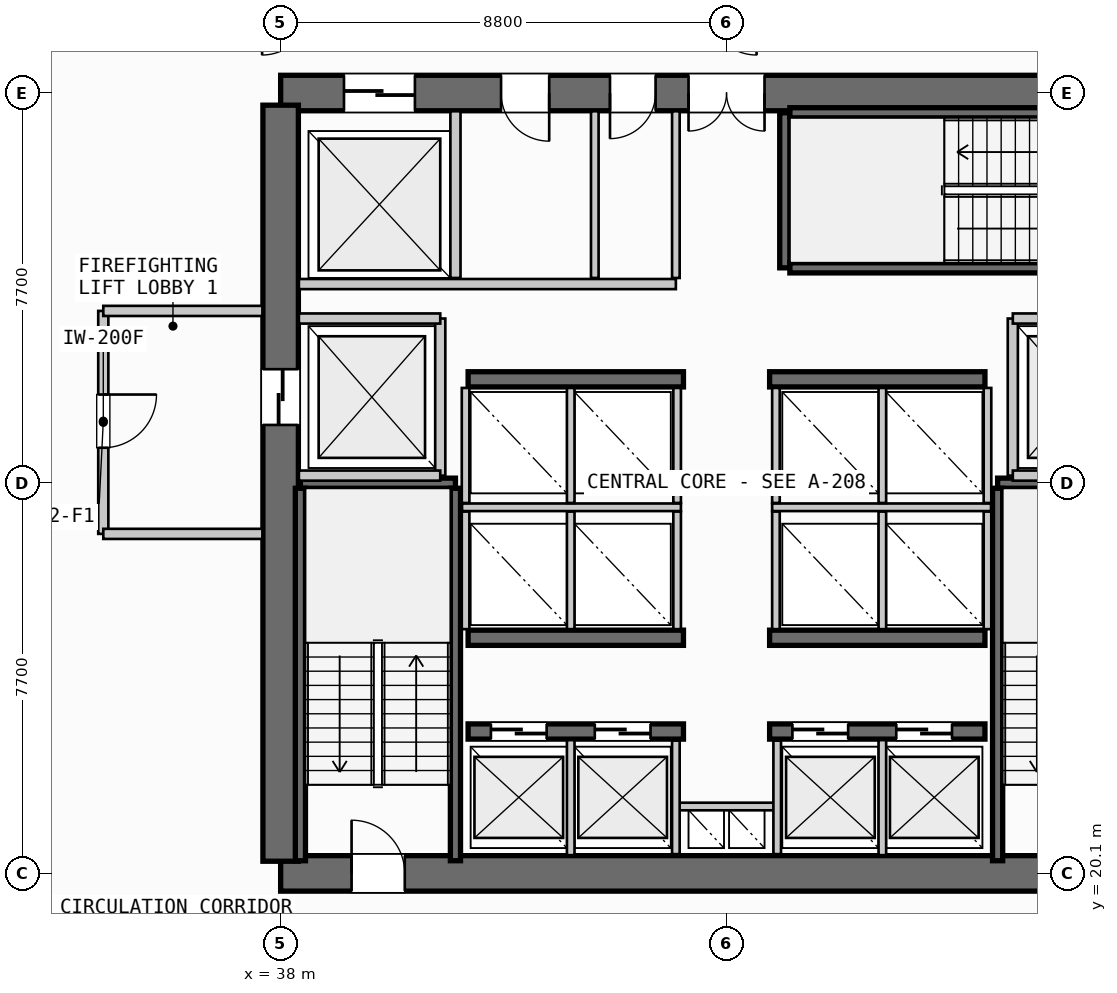
"""IFC4 building model, lengths in metres.
Left out: names, types, materials, properties, quantities, classifications, styles, units other than length and angle.
Written with IfcOpenShell. Run it as: python <this file> out.ifc"""

import sys

from ifc_helpers import new_model, si_unit, direction, frame, frame_2d, origin, place, context, subcontext, project, spatial, rectangle, extrude, source, transform, mapped, element, fill, save


model = new_model("IFC4")
c1 = context("Model", 3, precision=1e-05, world=origin(), true_north=direction((0.0, 1.0)))
c2 = subcontext(c1, "Body", "Model", "MODEL_VIEW")
j1 = project(units=[si_unit("LENGTHUNIT", "METRE"), si_unit("PLANEANGLEUNIT", "RADIAN")], contexts=[c1])
p1 = place(None, origin())
s1 = spatial("IfcSite", under=j1, at=p1, CompositionType="ELEMENT")
p2 = place(p1, origin())
s2 = spatial("IfcBuilding", under=s1, at=p2, CompositionType="ELEMENT")
p3 = place(p2, frame((0.0, 0.0, 52.4)))
s3 = spatial("IfcBuildingStorey", under=s2, at=p3, CompositionType="ELEMENT", Elevation=52.4)
p4 = place(p3, frame((38.0, 20.1, 0.0), z_axis=(0.0, 0.0, 1.0), x_axis=(1.0, 0.0, 0.0)))
e1 = element("IfcWall", 1, at=p4, inside=s3, PredefinedType="SHEAR", context=c2, shape_type="SweptSolid", body=[
    extrude(rectangle(XDim=17.6, YDim=0.7, at=frame_2d((8.8, 0.0))), origin(), (0.0, 0.0, 1.0), 3.55),
])
p5 = place(p4, frame((1.4, 0.0, 0.0)))
e2 = element("IfcOpeningElement", 2, at=p5, cuts=e1, PredefinedType="OPENING", context=c2, shape_type="SweptSolid", body=[
    extrude(rectangle(XDim=1.05, YDim=2.15, at=frame_2d((0.525, 1.075))), frame((0.0, 0.36, 0.0), z_axis=(0.0, -1.0, 0.0), x_axis=(1.0, 0.0, 0.0)), (0.0, 0.0, 1.0), 0.72),
])
p6 = place(p4, frame((15.15, 0.0, 0.0)))
e3 = element("IfcOpeningElement", 3, at=p6, cuts=e1, PredefinedType="OPENING", context=c2, shape_type="SweptSolid", body=[
    extrude(rectangle(XDim=1.05, YDim=2.15, at=frame_2d((0.525, 1.075))), frame((0.0, 0.36, 0.0), z_axis=(0.0, -1.0, 0.0), x_axis=(1.0, 0.0, 0.0)), (0.0, 0.0, 1.0), 0.72),
])
p7 = place(p3, frame((55.6, 35.5, 0.0), z_axis=(0.0, 0.0, 1.0), x_axis=(-1.0, 0.0, 0.0)))
e4 = element("IfcWall", 4, at=p7, inside=s3, PredefinedType="SHEAR", context=c2, shape_type="SweptSolid", body=[
    extrude(rectangle(XDim=17.6, YDim=0.7, at=frame_2d((8.8, 0.0))), origin(), (0.0, 0.0, 1.0), 3.55),
])
p8 = place(p7, frame((8.05, 0.0, 0.0)))
e5 = element("IfcOpeningElement", 5, at=p8, cuts=e4, PredefinedType="OPENING", context=c2, shape_type="SweptSolid", body=[
    extrude(rectangle(XDim=1.5, YDim=2.2, at=frame_2d((0.75, 1.1))), frame((0.0, 0.36, 0.0), z_axis=(0.0, -1.0, 0.0), x_axis=(1.0, 0.0, 0.0)), (0.0, 0.0, 1.0), 0.72),
])
p9 = place(p7, frame((14.95, 0.0, 0.0)))
e6 = element("IfcOpeningElement", 6, at=p9, cuts=e4, PredefinedType="OPENING", context=c2, shape_type="SweptSolid", body=[
    extrude(rectangle(XDim=1.4, YDim=2.3, at=frame_2d((0.7, 1.15))), frame((0.0, 0.36, 0.0), z_axis=(0.0, -1.0, 0.0), x_axis=(1.0, 0.0, 0.0)), (0.0, 0.0, 1.0), 0.72),
])
p10 = place(p7, frame((12.3, 0.0, 0.0)))
e7 = element("IfcOpeningElement", 7, at=p10, cuts=e4, PredefinedType="OPENING", context=c2, shape_type="SweptSolid", body=[
    extrude(rectangle(XDim=0.95, YDim=2.15, at=frame_2d((0.475, 1.075))), frame((0.0, 0.36, 0.0), z_axis=(0.0, -1.0, 0.0), x_axis=(1.0, 0.0, 0.0)), (0.0, 0.0, 1.0), 0.72),
])
p11 = place(p7, frame((10.2, 0.0, 0.0)))
e8 = element("IfcOpeningElement", 8, at=p11, cuts=e4, PredefinedType="OPENING", context=c2, shape_type="SweptSolid", body=[
    extrude(rectangle(XDim=0.9, YDim=2.15, at=frame_2d((0.45, 1.075))), frame((0.0, 0.36, 0.0), z_axis=(0.0, -1.0, 0.0), x_axis=(1.0, 0.0, 0.0)), (0.0, 0.0, 1.0), 0.72),
])
p12 = place(p3, frame((38.0, 35.26, 0.0), z_axis=(0.0, 0.0, 1.0), x_axis=(0.0, -1.0, 0.0)))
e9 = element("IfcWall", 9, at=p12, inside=s3, PredefinedType="SHEAR", context=c2, shape_type="SweptSolid", body=[
    extrude(rectangle(XDim=14.92, YDim=0.7, at=frame_2d((7.46, 0.0))), origin(), (0.0, 0.0, 1.0), 3.55),
])
p13 = place(p12, frame((5.21, 0.0, 0.0)))
e10 = element("IfcOpeningElement", 10, at=p13, cuts=e9, PredefinedType="OPENING", context=c2, shape_type="SweptSolid", body=[
    extrude(rectangle(XDim=1.1, YDim=2.2, at=frame_2d((0.55, 1.1))), frame((0.0, 0.36, 0.0), z_axis=(0.0, -1.0, 0.0), x_axis=(1.0, 0.0, 0.0)), (0.0, 0.0, 1.0), 0.72),
])
p14 = place(p3, frame((41.7, 22.9, 0.0), z_axis=(0.0, 0.0, 1.0), x_axis=(1.0, 0.0, 0.0)))
e11 = element("IfcWall", 11, at=p14, inside=s3, PredefinedType="SHEAR", context=c2, shape_type="SweptSolid", body=[
    extrude(rectangle(XDim=4.25, YDim=0.3, at=frame_2d((2.125, 0.0))), origin(), (0.0, 0.0, 1.0), 3.55),
])
p15 = place(p14, frame((0.45, 0.0, 0.0)))
e12 = element("IfcOpeningElement", 12, at=p15, cuts=e11, PredefinedType="OPENING", context=c2, shape_type="SweptSolid", body=[
    extrude(rectangle(XDim=1.1, YDim=2.2, at=frame_2d((0.55, 1.1))), frame((0.0, 0.16, 0.0), z_axis=(0.0, -1.0, 0.0), x_axis=(1.0, 0.0, 0.0)), (0.0, 0.0, 1.0), 0.32),
])
p16 = place(p14, frame((2.5, 0.0, 0.0)))
e13 = element("IfcOpeningElement", 13, at=p16, cuts=e11, PredefinedType="OPENING", context=c2, shape_type="SweptSolid", body=[
    extrude(rectangle(XDim=1.1, YDim=2.2, at=frame_2d((0.55, 1.1))), frame((0.0, 0.16, 0.0), z_axis=(0.0, -1.0, 0.0), x_axis=(1.0, 0.0, 0.0)), (0.0, 0.0, 1.0), 0.32),
])
p17 = place(p3, frame((47.65, 22.9, 0.0), z_axis=(0.0, 0.0, 1.0), x_axis=(1.0, 0.0, 0.0)))
e14 = element("IfcWall", 14, at=p17, inside=s3, PredefinedType="SHEAR", context=c2, shape_type="SweptSolid", body=[
    extrude(rectangle(XDim=4.25, YDim=0.3, at=frame_2d((2.125, 0.0))), origin(), (0.0, 0.0, 1.0), 3.55),
])
p18 = place(p17, frame((0.45, 0.0, 0.0)))
e15 = element("IfcOpeningElement", 15, at=p18, cuts=e14, PredefinedType="OPENING", context=c2, shape_type="SweptSolid", body=[
    extrude(rectangle(XDim=1.1, YDim=2.2, at=frame_2d((0.55, 1.1))), frame((0.0, 0.16, 0.0), z_axis=(0.0, -1.0, 0.0), x_axis=(1.0, 0.0, 0.0)), (0.0, 0.0, 1.0), 0.32),
])
p19 = place(p17, frame((2.5, 0.0, 0.0)))
e16 = element("IfcOpeningElement", 16, at=p19, cuts=e14, PredefinedType="OPENING", context=c2, shape_type="SweptSolid", body=[
    extrude(rectangle(XDim=1.1, YDim=2.2, at=frame_2d((0.55, 1.1))), frame((0.0, 0.16, 0.0), z_axis=(0.0, -1.0, 0.0), x_axis=(1.0, 0.0, 0.0)), (0.0, 0.0, 1.0), 0.32),
])
for number, where, z_axis, x_axis in (
    (17, (41.7, 24.75, 0.0), (0.0, 0.0, 1.0), (1.0, 0.0, 0.0)),
    (18, (47.65, 24.75, 0.0), (0.0, 0.0, 1.0), (1.0, 0.0, 0.0)),
    (19, (41.7, 29.85, 0.0), (0.0, 0.0, 1.0), (1.0, 0.0, 0.0)),
    (20, (47.65, 29.85, 0.0), (0.0, 0.0, 1.0), (1.0, 0.0, 0.0)),
):
    element("IfcWall", number, at=place(p3, frame(where, z_axis=z_axis, x_axis=x_axis)), inside=s3, PredefinedType="SHEAR", context=c2, shape_type="SweptSolid", body=[
        extrude(rectangle(XDim=4.25, YDim=0.3, at=frame_2d((2.125, 0.0))), origin(), (0.0, 0.0, 1.0), 3.55),
    ])
p20 = place(p3, frame((38.39, 27.8, 0.0), z_axis=(0.0, 0.0, 1.0), x_axis=(1.0, 0.0, 0.0)))
e21 = element("IfcWall", 21, at=p20, inside=s3, PredefinedType="SHEAR", context=c2, shape_type="SweptSolid", body=[
    extrude(rectangle(XDim=3.06, YDim=0.2, at=frame_2d((1.53, 0.0))), origin(), (0.0, 0.0, 1.0), 3.55),
])
for number, where, z_axis, x_axis in (
    (22, (41.45, 27.7, 0.0), (0.0, 0.0, 1.0), (0.0, -1.0, 0.0)),
    (23, (38.39, 20.35, 0.0), (0.0, 0.0, 1.0), (0.0, 1.0, 0.0)),
):
    element("IfcWall", number, at=place(p3, frame(where, z_axis=z_axis, x_axis=x_axis)), inside=s3, PredefinedType="SHEAR", context=c2, shape_type="SweptSolid", body=[
        extrude(rectangle(XDim=7.35, YDim=0.2, at=frame_2d((3.675, 0.0))), origin(), (0.0, 0.0, 1.0), 3.55),
    ])
p21 = place(p3, frame((52.15, 27.8, 0.0), z_axis=(0.0, 0.0, 1.0), x_axis=(1.0, 0.0, 0.0)))
e24 = element("IfcWall", 24, at=p21, inside=s3, PredefinedType="SHEAR", context=c2, shape_type="SweptSolid", body=[
    extrude(rectangle(XDim=3.06, YDim=0.2, at=frame_2d((1.53, 0.0))), origin(), (0.0, 0.0, 1.0), 3.55),
])
p22 = place(p3, frame((52.15, 20.35, 0.0), z_axis=(0.0, 0.0, 1.0), x_axis=(0.0, 1.0, 0.0)))
e25 = element("IfcWall", 25, at=p22, inside=s3, PredefinedType="SHEAR", context=c2, shape_type="SweptSolid", body=[
    extrude(rectangle(XDim=7.35, YDim=0.2, at=frame_2d((3.675, 0.0))), origin(), (0.0, 0.0, 1.0), 3.55),
])
p23 = place(p3, frame((47.95, 32.05, 0.0), z_axis=(0.0, 0.0, 1.0), x_axis=(0.0, 1.0, 0.0)))
e26 = element("IfcWall", 26, at=p23, inside=s3, PredefinedType="SHEAR", context=c2, shape_type="SweptSolid", body=[
    extrude(rectangle(XDim=3.06, YDim=0.2, at=frame_2d((1.53, 0.0))), origin(), (0.0, 0.0, 1.0), 3.55),
])
for number, where, z_axis, x_axis in (
    (27, (48.05, 35.11, 0.0), (0.0, 0.0, 1.0), (1.0, 0.0, 0.0)),
    (28, (55.4, 32.05, 0.0), (0.0, 0.0, 1.0), (-1.0, 0.0, 0.0)),
):
    element("IfcWall", number, at=place(p3, frame(where, z_axis=z_axis, x_axis=x_axis)), inside=s3, PredefinedType="SHEAR", context=c2, shape_type="SweptSolid", body=[
        extrude(rectangle(XDim=7.35, YDim=0.2, at=frame_2d((3.675, 0.0))), origin(), (0.0, 0.0, 1.0), 3.55),
    ])
p24 = place(p3, frame((45.8, 21.42, 0.0), z_axis=(0.0, 0.0, 1.0), x_axis=(1.0, 0.0, 0.0)))
e29 = element("IfcWall", 29, at=p24, inside=s3, PredefinedType="PARTITIONING", context=c2, shape_type="SweptSolid", body=[
    extrude(rectangle(XDim=2.0, YDim=0.15, at=frame_2d((1.0, 0.0))), origin(), (0.0, 0.0, 1.0), 2.645),
])
for number, where, z_axis, x_axis in (
    (30, (45.8, 20.48, 0.0), (0.0, 0.0, 1.0), (0.0, 1.0, 0.0)),
    (31, (47.8, 20.48, 0.0), (0.0, 0.0, 1.0), (0.0, 1.0, 0.0)),
):
    element("IfcWall", number, at=place(p3, frame(where, z_axis=z_axis, x_axis=x_axis)), inside=s3, PredefinedType="PARTITIONING", context=c2, shape_type="SweptSolid", body=[
        extrude(rectangle(XDim=2.24, YDim=0.15, at=frame_2d((1.12, 0.0))), origin(), (0.0, 0.0, 1.0), 2.645),
    ])
p25 = place(p3, frame((41.15, 27.95, 0.0), z_axis=(0.0, 0.0, 1.0), x_axis=(0.0, 1.0, 0.0)))
e32 = element("IfcWall", 32, at=p25, inside=s3, PredefinedType="PARTITIONING", context=c2, shape_type="SweptSolid", body=[
    extrude(rectangle(XDim=3.1, YDim=0.2, at=frame_2d((1.55, 0.0))), origin(), (0.0, 0.0, 1.0), 2.645),
])
for number, where, z_axis, x_axis in (
    (33, (38.36, 27.95, 0.0), (0.0, 0.0, 1.0), (1.0, 0.0, 0.0)),
    (34, (38.36, 31.05, 0.0), (0.0, 0.0, 1.0), (1.0, 0.0, 0.0)),
):
    element("IfcWall", number, at=place(p3, frame(where, z_axis=z_axis, x_axis=x_axis)), inside=s3, PredefinedType="PARTITIONING", context=c2, shape_type="SweptSolid", body=[
        extrude(rectangle(XDim=2.79, YDim=0.2, at=frame_2d((1.395, 0.0))), origin(), (0.0, 0.0, 1.0), 2.645),
    ])
p26 = place(p3, frame((34.5, 31.2, 0.0), z_axis=(0.0, 0.0, 1.0), x_axis=(0.0, -1.0, 0.0)))
e35 = element("IfcWall", 35, at=p26, inside=s3, PredefinedType="PARTITIONING", context=c2, shape_type="SweptSolid", body=[
    extrude(rectangle(XDim=4.4, YDim=0.2, at=frame_2d((2.2, 0.0))), origin(), (0.0, 0.0, 1.0), 2.645),
])
p27 = place(p26, frame((1.65, 0.0, 0.0)))
e36 = element("IfcOpeningElement", 36, at=p27, cuts=e35, PredefinedType="OPENING", context=c2, shape_type="SweptSolid", body=[
    extrude(rectangle(XDim=1.05, YDim=2.15, at=frame_2d((0.525, 1.075))), frame((0.0, 0.11, 0.0), z_axis=(0.0, -1.0, 0.0), x_axis=(1.0, 0.0, 0.0)), (0.0, 0.0, 1.0), 0.22),
])
for number, where, z_axis, x_axis in (
    (37, (34.5, 26.8, 0.0), (0.0, 0.0, 1.0), (1.0, 0.0, 0.0)),
    (38, (34.5, 31.2, 0.0), (0.0, 0.0, 1.0), (1.0, 0.0, 0.0)),
):
    element("IfcWall", number, at=place(p3, frame(where, z_axis=z_axis, x_axis=x_axis)), inside=s3, PredefinedType="PARTITIONING", context=c2, shape_type="SweptSolid", body=[
        extrude(rectangle(XDim=3.14, YDim=0.2, at=frame_2d((1.57, 0.0))), origin(), (0.0, 0.0, 1.0), 2.645),
    ])
p28 = place(p3, frame((52.45, 27.95, 0.0), z_axis=(0.0, 0.0, 1.0), x_axis=(0.0, 1.0, 0.0)))
e39 = element("IfcWall", 39, at=p28, inside=s3, PredefinedType="PARTITIONING", context=c2, shape_type="SweptSolid", body=[
    extrude(rectangle(XDim=3.1, YDim=0.2, at=frame_2d((1.55, 0.0))), origin(), (0.0, 0.0, 1.0), 2.645),
])
for number, where, z_axis, x_axis in (
    (40, (52.45, 27.95, 0.0), (0.0, 0.0, 1.0), (1.0, 0.0, 0.0)),
    (41, (52.45, 31.05, 0.0), (0.0, 0.0, 1.0), (1.0, 0.0, 0.0)),
):
    element("IfcWall", number, at=place(p3, frame(where, z_axis=z_axis, x_axis=x_axis)), inside=s3, PredefinedType="PARTITIONING", context=c2, shape_type="SweptSolid", body=[
        extrude(rectangle(XDim=2.79, YDim=0.2, at=frame_2d((1.395, 0.0))), origin(), (0.0, 0.0, 1.0), 2.645),
    ])
for number, where, z_axis, x_axis in (
    (42, (43.725, 20.46, 0.0), (0.0, 0.0, 1.0), (0.0, 1.0, 0.0)),
    (43, (49.875, 20.46, 0.0), (0.0, 0.0, 1.0), (0.0, 1.0, 0.0)),
):
    element("IfcWall", number, at=place(p3, frame(where, z_axis=z_axis, x_axis=x_axis)), inside=s3, PredefinedType="PARTITIONING", context=c2, shape_type="SweptSolid", body=[
        extrude(rectangle(XDim=2.27, YDim=0.15, at=frame_2d((1.135, 0.0))), origin(), (0.0, 0.0, 1.0), 2.645),
    ])
p29 = place(p3, frame((41.58, 27.325, 0.0), z_axis=(0.0, 0.0, 1.0), x_axis=(1.0, 0.0, 0.0)))
e44 = element("IfcWall", 44, at=p29, inside=s3, PredefinedType="PARTITIONING", context=c2, shape_type="SweptSolid", body=[
    extrude(rectangle(XDim=4.32, YDim=0.15, at=frame_2d((2.16, 0.0))), origin(), (0.0, 0.0, 1.0), 2.645),
])
p30 = place(p3, frame((47.7, 27.325, 0.0), z_axis=(0.0, 0.0, 1.0), x_axis=(1.0, 0.0, 0.0)))
e45 = element("IfcWall", 45, at=p30, inside=s3, PredefinedType="PARTITIONING", context=c2, shape_type="SweptSolid", body=[
    extrude(rectangle(XDim=4.32, YDim=0.15, at=frame_2d((2.16, 0.0))), origin(), (0.0, 0.0, 1.0), 2.645),
])
for number, where, z_axis, x_axis in (
    (46, (41.65, 24.92, 0.0), (0.0, 0.0, 1.0), (0.0, 1.0, 0.0)),
    (47, (43.725, 24.92, 0.0), (0.0, 0.0, 1.0), (0.0, 1.0, 0.0)),
    (48, (45.825, 24.92, 0.0), (0.0, 0.0, 1.0), (0.0, 1.0, 0.0)),
    (49, (47.775, 24.92, 0.0), (0.0, 0.0, 1.0), (0.0, 1.0, 0.0)),
    (50, (49.875, 24.92, 0.0), (0.0, 0.0, 1.0), (0.0, 1.0, 0.0)),
    (51, (51.95, 24.92, 0.0), (0.0, 0.0, 1.0), (0.0, 1.0, 0.0)),
):
    element("IfcWall", number, at=place(p3, frame(where, z_axis=z_axis, x_axis=x_axis)), inside=s3, PredefinedType="PARTITIONING", context=c2, shape_type="SweptSolid", body=[
        extrude(rectangle(XDim=2.32, YDim=0.15, at=frame_2d((1.16, 0.0))), origin(), (0.0, 0.0, 1.0), 2.645),
    ])
for number, where, z_axis, x_axis in (
    (52, (41.65, 27.41, 0.0), (0.0, 0.0, 1.0), (0.0, 1.0, 0.0)),
    (53, (43.725, 27.41, 0.0), (0.0, 0.0, 1.0), (0.0, 1.0, 0.0)),
    (54, (45.825, 27.41, 0.0), (0.0, 0.0, 1.0), (0.0, 1.0, 0.0)),
    (55, (47.775, 27.41, 0.0), (0.0, 0.0, 1.0), (0.0, 1.0, 0.0)),
    (56, (49.875, 27.41, 0.0), (0.0, 0.0, 1.0), (0.0, 1.0, 0.0)),
    (57, (51.95, 27.41, 0.0), (0.0, 0.0, 1.0), (0.0, 1.0, 0.0)),
):
    element("IfcWall", number, at=place(p3, frame(where, z_axis=z_axis, x_axis=x_axis)), inside=s3, PredefinedType="PARTITIONING", context=c2, shape_type="SweptSolid", body=[
        extrude(rectangle(XDim=2.27, YDim=0.15, at=frame_2d((1.135, 0.0))), origin(), (0.0, 0.0, 1.0), 2.645),
    ])
p31 = place(p3, frame((41.45, 31.85, 0.0), z_axis=(0.0, 0.0, 1.0), x_axis=(0.0, 1.0, 0.0)))
e58 = element("IfcWall", 58, at=p31, inside=s3, PredefinedType="PARTITIONING", context=c2, shape_type="SweptSolid", body=[
    extrude(rectangle(XDim=3.29, YDim=0.2, at=frame_2d((1.645, 0.0))), origin(), (0.0, 0.0, 1.0), 2.645),
])
p32 = place(p3, frame((38.36, 31.73, 0.0), z_axis=(0.0, 0.0, 1.0), x_axis=(1.0, 0.0, 0.0)))
e59 = element("IfcWall", 59, at=p32, inside=s3, PredefinedType="PARTITIONING", context=c2, shape_type="SweptSolid", body=[
    extrude(rectangle(XDim=7.44, YDim=0.2, at=frame_2d((3.72, 0.0))), origin(), (0.0, 0.0, 1.0), 2.645),
])
p33 = place(p3, frame((45.8, 31.85, 0.0), z_axis=(0.0, 0.0, 1.0), x_axis=(0.0, 1.0, 0.0)))
e60 = element("IfcWall", 60, at=p33, inside=s3, PredefinedType="PARTITIONING", context=c2, shape_type="SweptSolid", body=[
    extrude(rectangle(XDim=3.29, YDim=0.15, at=frame_2d((1.645, 0.0))), origin(), (0.0, 0.0, 1.0), 2.645),
])
p34 = place(p3, frame((44.2, 31.85, 0.0), z_axis=(0.0, 0.0, 1.0), x_axis=(0.0, 1.0, 0.0)))
e61 = element("IfcWall", 61, at=p34, inside=s3, PredefinedType="PLUMBINGWALL", context=c2, shape_type="SweptSolid", body=[
    extrude(rectangle(XDim=3.29, YDim=0.15, at=frame_2d((1.645, 0.0))), origin(), (0.0, 0.0, 1.0), 2.645),
])
m1 = source(origin(), c2, "Body", "SweptSolid", [
    extrude(rectangle(XDim=1.05, YDim=2.15, at=frame_2d((0.525, 1.075))), frame((0.0, 0.025, 0.0), z_axis=(0.0, -1.0, 0.0), x_axis=(1.0, 0.0, 0.0)), (0.0, 0.0, 1.0), 0.05),
])
p35 = place(p5, origin())
e62 = element("IfcDoor", 62, at=p35, inside=s3, OperationType="SINGLE_SWING_LEFT", PredefinedType="DOOR", context=c2, shape_type="MappedRepresentation", body=[
    mapped(m1, transform((0.0, 0.0, 0.0), scale=1.0)),
])
fill(e2, e62)
m2 = source(origin(), c2, "Body", "SweptSolid", [
    extrude(rectangle(XDim=1.5, YDim=2.2, at=frame_2d((0.75, 1.1))), frame((0.0, 0.025, 0.0), z_axis=(0.0, -1.0, 0.0), x_axis=(1.0, 0.0, 0.0)), (0.0, 0.0, 1.0), 0.05),
])
p36 = place(p8, origin())
e63 = element("IfcDoor", 63, at=p36, inside=s3, OperationType="DOUBLE_DOOR_SINGLE_SWING", PredefinedType="DOOR", context=c2, shape_type="MappedRepresentation", body=[
    mapped(m2, transform((0.0, 0.0, 0.0), scale=1.0)),
])
fill(e5, e63)
m3 = source(origin(), c2, "Body", "SweptSolid", [
    extrude(rectangle(XDim=1.1, YDim=2.2, at=frame_2d((0.55, 1.1))), frame((0.0, 0.025, 0.0), z_axis=(0.0, -1.0, 0.0), x_axis=(1.0, 0.0, 0.0)), (0.0, 0.0, 1.0), 0.05),
])
p37 = place(p13, origin())
e64 = element("IfcDoor", 64, at=p37, inside=s3, OperationType="SLIDING_TO_LEFT", PredefinedType="DOOR", context=c2, shape_type="MappedRepresentation", body=[
    mapped(m3, transform((0.0, 0.0, 0.0), scale=1.0)),
])
fill(e10, e64)
p38 = place(p15, origin())
e65 = element("IfcDoor", 65, at=p38, inside=s3, OperationType="SLIDING_TO_LEFT", PredefinedType="DOOR", context=c2, shape_type="MappedRepresentation", body=[
    mapped(m3, transform((0.0, 0.0, 0.0), scale=1.0)),
])
fill(e12, e65)
p39 = place(p16, origin())
e66 = element("IfcDoor", 66, at=p39, inside=s3, OperationType="SLIDING_TO_LEFT", PredefinedType="DOOR", context=c2, shape_type="MappedRepresentation", body=[
    mapped(m3, transform((0.0, 0.0, 0.0), scale=1.0)),
])
fill(e13, e66)
p40 = place(p18, origin())
e67 = element("IfcDoor", 67, at=p40, inside=s3, OperationType="SLIDING_TO_LEFT", PredefinedType="DOOR", context=c2, shape_type="MappedRepresentation", body=[
    mapped(m3, transform((0.0, 0.0, 0.0), scale=1.0)),
])
fill(e15, e67)
p41 = place(p19, origin())
e68 = element("IfcDoor", 68, at=p41, inside=s3, OperationType="SLIDING_TO_LEFT", PredefinedType="DOOR", context=c2, shape_type="MappedRepresentation", body=[
    mapped(m3, transform((0.0, 0.0, 0.0), scale=1.0)),
])
fill(e16, e68)
m4 = source(origin(), c2, "Body", "SweptSolid", [
    extrude(rectangle(XDim=1.4, YDim=2.3, at=frame_2d((0.7, 1.15))), frame((0.0, 0.025, 0.0), z_axis=(0.0, -1.0, 0.0), x_axis=(1.0, 0.0, 0.0)), (0.0, 0.0, 1.0), 0.05),
])
p42 = place(p9, origin())
e69 = element("IfcDoor", 69, at=p42, inside=s3, OperationType="SLIDING_TO_RIGHT", PredefinedType="DOOR", context=c2, shape_type="MappedRepresentation", body=[
    mapped(m4, transform((0.0, 0.0, 0.0), scale=1.0)),
])
fill(e6, e69)
m5 = source(origin(), c2, "Body", "SweptSolid", [
    extrude(rectangle(XDim=0.95, YDim=2.15, at=frame_2d((0.475, 1.075))), frame((0.0, 0.025, 0.0), z_axis=(0.0, -1.0, 0.0), x_axis=(1.0, 0.0, 0.0)), (0.0, 0.0, 1.0), 0.05),
])
p43 = place(p10, origin())
e70 = element("IfcDoor", 70, at=p43, inside=s3, OperationType="SINGLE_SWING_LEFT", PredefinedType="DOOR", context=c2, shape_type="MappedRepresentation", body=[
    mapped(m5, transform((0.0, 0.0, 0.0), scale=1.0)),
])
fill(e7, e70)
m6 = source(origin(), c2, "Body", "SweptSolid", [
    extrude(rectangle(XDim=0.9, YDim=2.15, at=frame_2d((0.45, 1.075))), frame((0.0, 0.025, 0.0), z_axis=(0.0, -1.0, 0.0), x_axis=(1.0, 0.0, 0.0)), (0.0, 0.0, 1.0), 0.05),
])
p44 = place(p11, origin())
e71 = element("IfcDoor", 71, at=p44, inside=s3, OperationType="SINGLE_SWING_RIGHT", PredefinedType="DOOR", context=c2, shape_type="MappedRepresentation", body=[
    mapped(m6, transform((0.0, 0.0, 0.0), scale=1.0)),
])
fill(e8, e71)
p45 = place(p27, origin())
e72 = element("IfcDoor", 72, at=p45, inside=s3, OperationType="SINGLE_SWING_LEFT", PredefinedType="DOOR", context=c2, shape_type="MappedRepresentation", body=[
    mapped(m1, transform((0.0, 0.0, 0.0), scale=1.0)),
])
fill(e36, e72)
save(model, sys.argv[1])
